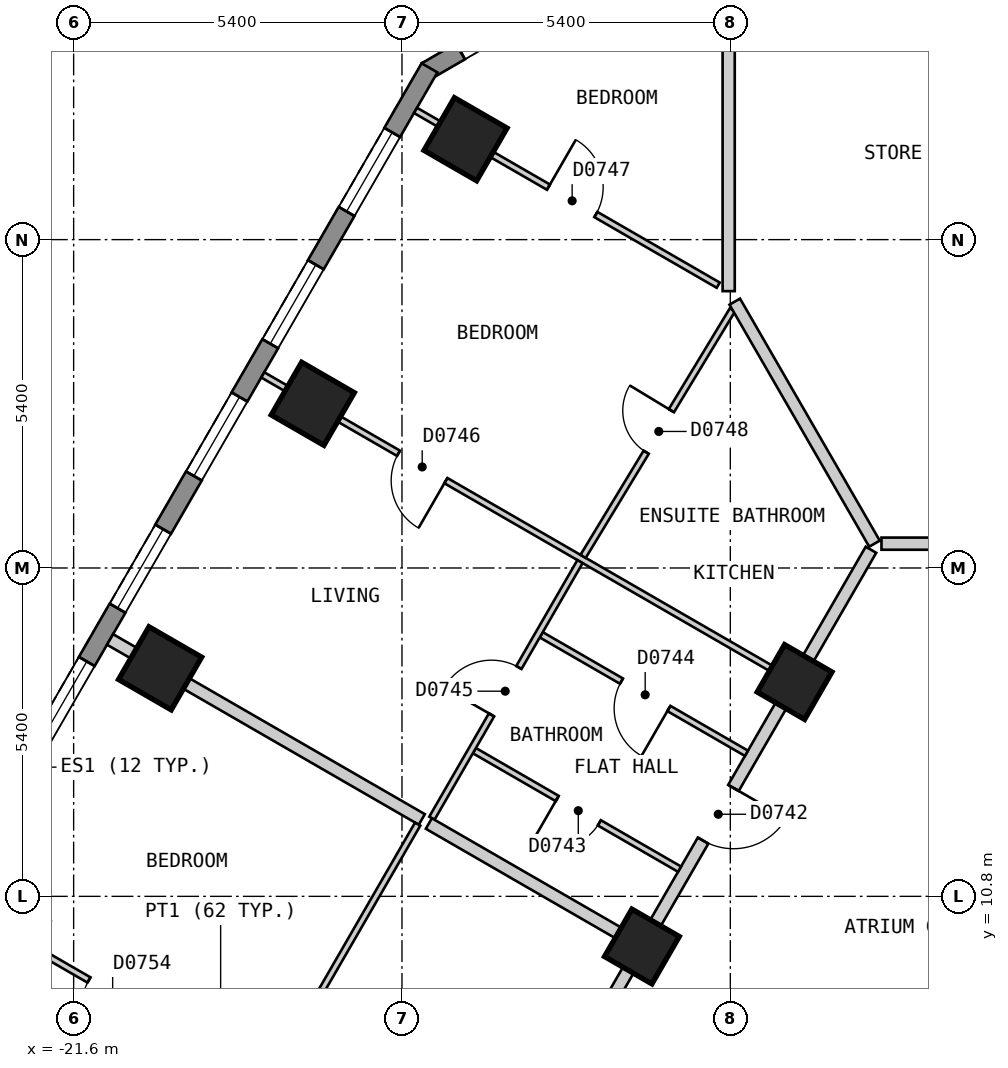
"""IFC4 building model, lengths in metres.
Left out: names, types, materials, properties, quantities, classifications, styles, units other than length and angle.
Written with IfcOpenShell. Run it as: python <this file> out.ifc"""

import sys

from ifc_helpers import new_model, si_unit, direction, frame, frame_2d, origin, origin_2d, place, context, subcontext, project, spatial, polyline, rectangle, outline, extrude, element, fill, save


model = new_model("IFC4")
c1 = context("Model", 3, precision=1e-05, world=origin(), true_north=direction((0.0, 1.0)))
c2 = subcontext(c1, "Body", "Model", "MODEL_VIEW")
j1 = project(units=[si_unit("LENGTHUNIT", "METRE"), si_unit("PLANEANGLEUNIT", "RADIAN")], contexts=[c1])
p1 = place(None, origin())
s1 = spatial("IfcSite", under=j1, at=p1, CompositionType="ELEMENT")
p2 = place(p1, origin())
s2 = spatial("IfcBuilding", under=s1, at=p2, CompositionType="ELEMENT")
p3 = place(p2, frame((0.0, 0.0, 93.0)))
s3 = spatial("IfcBuildingStorey", under=s2, at=p3, CompositionType="ELEMENT", Elevation=93.0)
for number, where, z_axis, x_axis in (
    (1, (-15.155, 23.251, 0.0), (0.0, 0.0, 1.0), (-0.5, -0.866, 0.0)),
    (2, (-17.667, 18.9, 0.0), (0.0, 0.0, 1.0), (-0.5, -0.866, 0.0)),
    (3, (-20.178, 14.55, 0.0), (0.0, 0.0, 1.0), (-0.5, -0.866, 0.0)),
):
    element("IfcColumn", number, at=place(p3, frame(where, z_axis=z_axis, x_axis=x_axis)), inside=s3, PredefinedType="COLUMN", context=c2, shape_type="SweptSolid", body=[
        extrude(rectangle(XDim=1.0, YDim=1.0, at=origin_2d()), origin(), (0.0, 0.0, 1.0), 3.0),
    ])
for number, where, z_axis, x_axis in (
    (4, (-9.743, 14.325, 0.0), (0.0, 0.0, 1.0), (-0.5, -0.866, 0.0)),
    (5, (-12.254, 9.975, 0.0), (0.0, 0.0, 1.0), (-0.5, -0.866, 0.0)),
):
    element("IfcColumn", number, at=place(p3, frame(where, z_axis=z_axis, x_axis=x_axis)), inside=s3, PredefinedType="COLUMN", context=c2, shape_type="SweptSolid", body=[
        extrude(rectangle(XDim=0.9, YDim=0.9, at=origin_2d()), origin(), (0.0, 0.0, 1.0), 3.0),
    ])
p4 = place(p3, frame((-11.472, 26.87, 0.0), z_axis=(0.0, 0.0, 1.0), x_axis=(-0.866022959057, -0.500004234368, 0.0)))
e6 = element("IfcWall", 6, at=p4, inside=s3, PredefinedType="SOLIDWALL", context=c2, shape_type="SweptSolid", body=[
    extrude(outline(polyline([(0.0, -0.15), (5.0, -0.15), (4.92, 0.15), (0.08, 0.15), (0.0, -0.15)])), origin(), (0.0, 0.0, 1.0), 2.7),
])
p5 = place(p4, frame((0.65, 0.0, 0.15)))
e7 = element("IfcOpeningElement", 7, at=p5, cuts=e6, PredefinedType="OPENING", context=c2, shape_type="SweptSolid", body=[
    extrude(rectangle(XDim=1.2, YDim=2.1, at=frame_2d((0.6, 1.05))), frame((0.0, 0.16, 0.0), z_axis=(0.0, -1.0, 0.0), x_axis=(1.0, 0.0, 0.0)), (0.0, 0.0, 1.0), 0.32),
])
p6 = place(p4, frame((3.149, 0.0, 0.15)))
e8 = element("IfcOpeningElement", 8, at=p6, cuts=e6, PredefinedType="OPENING", context=c2, shape_type="SweptSolid", body=[
    extrude(rectangle(XDim=1.2, YDim=2.1, at=frame_2d((0.6, 1.05))), frame((0.0, 0.16, 0.0), z_axis=(0.0, -1.0, 0.0), x_axis=(1.0, 0.0, 0.0)), (0.0, 0.0, 1.0), 0.32),
])
p7 = place(p3, frame((-15.747, 24.425, 0.0), z_axis=(0.0, 0.0, 1.0), x_axis=(-0.500027479704, -0.866009537788, 0.0)))
e9 = element("IfcWall", 9, at=p7, inside=s3, PredefinedType="SOLIDWALL", context=c2, shape_type="SweptSolid", body=[
    extrude(outline(polyline([(0.0, -0.15), (26.559, -0.15), (26.478, 0.15), (0.08, 0.15), (0.0, -0.15)])), origin(), (0.0, 0.0, 1.0), 2.7),
])
p8 = place(p7, frame((1.227, 0.0, 0.15)))
e10 = element("IfcOpeningElement", 10, at=p8, cuts=e9, PredefinedType="OPENING", context=c2, shape_type="SweptSolid", body=[
    extrude(rectangle(XDim=1.5, YDim=2.1, at=frame_2d((0.75, 1.05))), frame((0.0, 0.16, 0.0), z_axis=(0.0, -1.0, 0.0), x_axis=(1.0, 0.0, 0.0)), (0.0, 0.0, 1.0), 0.32),
])
p9 = place(p7, frame((3.739, 0.0, 0.15)))
e11 = element("IfcOpeningElement", 11, at=p9, cuts=e9, PredefinedType="OPENING", context=c2, shape_type="SweptSolid", body=[
    extrude(rectangle(XDim=1.5, YDim=2.1, at=frame_2d((0.75, 1.05))), frame((0.0, 0.16, 0.0), z_axis=(0.0, -1.0, 0.0), x_axis=(1.0, 0.0, 0.0)), (0.0, 0.0, 1.0), 0.32),
])
p10 = place(p7, frame((6.25, 0.0, 0.15)))
e12 = element("IfcOpeningElement", 12, at=p10, cuts=e9, PredefinedType="OPENING", context=c2, shape_type="SweptSolid", body=[
    extrude(rectangle(XDim=1.5, YDim=2.1, at=frame_2d((0.75, 1.05))), frame((0.0, 0.16, 0.0), z_axis=(0.0, -1.0, 0.0), x_axis=(1.0, 0.0, 0.0)), (0.0, 0.0, 1.0), 0.32),
])
p11 = place(p7, frame((8.761, 0.0, 0.15)))
e13 = element("IfcOpeningElement", 13, at=p11, cuts=e9, PredefinedType="OPENING", context=c2, shape_type="SweptSolid", body=[
    extrude(rectangle(XDim=1.5, YDim=2.1, at=frame_2d((0.75, 1.05))), frame((0.0, 0.16, 0.0), z_axis=(0.0, -1.0, 0.0), x_axis=(1.0, 0.0, 0.0)), (0.0, 0.0, 1.0), 0.32),
])
p12 = place(p7, frame((11.273, 0.0, 0.15)))
e14 = element("IfcOpeningElement", 14, at=p12, cuts=e9, PredefinedType="OPENING", context=c2, shape_type="SweptSolid", body=[
    extrude(rectangle(XDim=1.5, YDim=2.1, at=frame_2d((0.75, 1.05))), frame((0.0, 0.16, 0.0), z_axis=(0.0, -1.0, 0.0), x_axis=(1.0, 0.0, 0.0)), (0.0, 0.0, 1.0), 0.32),
])
p13 = place(p7, frame((13.785, 0.0, 0.15)))
e15 = element("IfcOpeningElement", 15, at=p13, cuts=e9, PredefinedType="OPENING", context=c2, shape_type="SweptSolid", body=[
    extrude(rectangle(XDim=1.5, YDim=2.1, at=frame_2d((0.75, 1.05))), frame((0.0, 0.16, 0.0), z_axis=(0.0, -1.0, 0.0), x_axis=(1.0, 0.0, 0.0)), (0.0, 0.0, 1.0), 0.32),
])
p14 = place(p7, frame((16.296, 0.0, 0.15)))
e16 = element("IfcOpeningElement", 16, at=p14, cuts=e9, PredefinedType="OPENING", context=c2, shape_type="SweptSolid", body=[
    extrude(rectangle(XDim=1.5, YDim=2.1, at=frame_2d((0.75, 1.05))), frame((0.0, 0.16, 0.0), z_axis=(0.0, -1.0, 0.0), x_axis=(1.0, 0.0, 0.0)), (0.0, 0.0, 1.0), 0.32),
])
p15 = place(p7, frame((18.807, 0.0, 0.15)))
e17 = element("IfcOpeningElement", 17, at=p15, cuts=e9, PredefinedType="OPENING", context=c2, shape_type="SweptSolid", body=[
    extrude(rectangle(XDim=1.5, YDim=2.1, at=frame_2d((0.75, 1.05))), frame((0.0, 0.16, 0.0), z_axis=(0.0, -1.0, 0.0), x_axis=(1.0, 0.0, 0.0)), (0.0, 0.0, 1.0), 0.32),
])
p16 = place(p7, frame((21.319, 0.0, 0.15)))
e18 = element("IfcOpeningElement", 18, at=p16, cuts=e9, PredefinedType="OPENING", context=c2, shape_type="SweptSolid", body=[
    extrude(rectangle(XDim=1.5, YDim=2.1, at=frame_2d((0.75, 1.05))), frame((0.0, 0.16, 0.0), z_axis=(0.0, -1.0, 0.0), x_axis=(1.0, 0.0, 0.0)), (0.0, 0.0, 1.0), 0.32),
])
p17 = place(p7, frame((23.831, 0.0, 0.15)))
e19 = element("IfcOpeningElement", 19, at=p17, cuts=e9, PredefinedType="OPENING", context=c2, shape_type="SweptSolid", body=[
    extrude(rectangle(XDim=1.5, YDim=2.1, at=frame_2d((0.75, 1.05))), frame((0.0, 0.16, 0.0), z_axis=(0.0, -1.0, 0.0), x_axis=(1.0, 0.0, 0.0)), (0.0, 0.0, 1.0), 0.32),
])
p18 = place(p3, frame((-8.314, 16.6, 0.0), z_axis=(0.0, 0.0, 1.0), x_axis=(1.0, 0.0, 0.0)))
e20 = element("IfcWall", 20, at=p18, inside=s3, PredefinedType="PARTITIONING", context=c2, shape_type="SweptSolid", body=[
    extrude(rectangle(XDim=2.309, YDim=0.2, at=frame_2d((1.155, 0.0))), origin(), (0.0, 0.0, 1.0), 2.7),
])
p19 = place(p18, frame((0.977, 0.0, 0.0)))
e21 = element("IfcOpeningElement", 21, at=p19, cuts=e20, PredefinedType="OPENING", context=c2, shape_type="SweptSolid", body=[
    extrude(rectangle(XDim=0.8, YDim=2.1, at=frame_2d((0.4, 1.05))), frame((0.0, 0.11, 0.0), z_axis=(0.0, -1.0, 0.0), x_axis=(1.0, 0.0, 0.0)), (0.0, 0.0, 1.0), 0.22),
])
p20 = place(p3, frame((-18.533, -0.901, 0.0), z_axis=(0.0, 0.0, 1.0), x_axis=(0.499981198768, 0.866036258409, 0.0)))
e22 = element("IfcWall", 22, at=p20, inside=s3, PredefinedType="PARTITIONING", context=c2, shape_type="SweptSolid", body=[
    extrude(rectangle(XDim=20.093, YDim=0.2, at=frame_2d((10.046, 0.0))), origin(), (0.0, 0.0, 1.0), 2.7),
])
p21 = place(p20, frame((14.57, 0.0, 0.0)))
e23 = element("IfcOpeningElement", 23, at=p21, cuts=e22, PredefinedType="OPENING", context=c2, shape_type="SweptSolid", body=[
    extrude(rectangle(XDim=1.0, YDim=2.1, at=frame_2d((0.5, 1.05))), frame((0.0, 0.11, 0.0), z_axis=(0.0, -1.0, 0.0), x_axis=(1.0, 0.0, 0.0)), (0.0, 0.0, 1.0), 0.22),
])
p22 = place(p20, frame((4.523, 0.0, 0.0)))
e24 = element("IfcOpeningElement", 24, at=p22, cuts=e22, PredefinedType="OPENING", context=c2, shape_type="SweptSolid", body=[
    extrude(rectangle(XDim=1.0, YDim=2.1, at=frame_2d((0.5, 1.05))), frame((0.0, 0.11, 0.0), z_axis=(0.0, -1.0, 0.0), x_axis=(1.0, 0.0, 0.0)), (0.0, 0.0, 1.0), 0.22),
])
p23 = place(p3, frame((-23.513, 10.675, 0.0), z_axis=(0.0, 0.0, 1.0), x_axis=(0.866041268327, -0.499972520799, 0.0)))
e25 = element("IfcWall", 25, at=p23, inside=s3, PredefinedType="PARTITIONING", context=c2, shape_type="SweptSolid", body=[
    extrude(rectangle(XDim=10.0, YDim=0.1, at=frame_2d((5.0, 0.0))), origin(), (0.0, 0.0, 1.0), 2.7),
])
p24 = place(p23, frame((7.55, 0.0, 0.0)))
e26 = element("IfcOpeningElement", 26, at=p24, cuts=e25, PredefinedType="OPENING", context=c2, shape_type="SweptSolid", body=[
    extrude(rectangle(XDim=0.9, YDim=2.1, at=frame_2d((0.45, 1.05))), frame((0.0, 0.06, 0.0), z_axis=(0.0, -1.0, 0.0), x_axis=(1.0, 0.0, 0.0)), (0.0, 0.0, 1.0), 0.12),
])
p25 = place(p23, frame((2.5, 0.0, 0.0)))
e27 = element("IfcOpeningElement", 27, at=p25, cuts=e25, PredefinedType="OPENING", context=c2, shape_type="SweptSolid", body=[
    extrude(rectangle(XDim=0.9, YDim=2.1, at=frame_2d((0.45, 1.05))), frame((0.0, 0.06, 0.0), z_axis=(0.0, -1.0, 0.0), x_axis=(1.0, 0.0, 0.0)), (0.0, 0.0, 1.0), 0.12),
])
p26 = place(p3, frame((-15.009, 13.196, 0.0), z_axis=(0.0, 0.0, 1.0), x_axis=(0.865916335424, -0.500188864377, 0.0)))
e28 = element("IfcWall", 28, at=p26, inside=s3, PredefinedType="PARTITIONING", context=c2, shape_type="SweptSolid", body=[
    extrude(rectangle(XDim=3.896, YDim=0.1, at=frame_2d((1.948, 0.0))), origin(), (0.0, 0.0, 1.0), 2.7),
])
p27 = place(p26, frame((1.573, 0.0, 0.0)))
e29 = element("IfcOpeningElement", 29, at=p27, cuts=e28, PredefinedType="OPENING", context=c2, shape_type="SweptSolid", body=[
    extrude(rectangle(XDim=0.8, YDim=2.1, at=frame_2d((0.4, 1.05))), frame((0.0, 0.06, 0.0), z_axis=(0.0, -1.0, 0.0), x_axis=(1.0, 0.0, 0.0)), (0.0, 0.0, 1.0), 0.12),
])
p28 = place(p3, frame((-13.909, 15.101, 0.0), z_axis=(0.0, 0.0, 1.0), x_axis=(0.866024880635, -0.500000906121, 0.0)))
e30 = element("IfcWall", 30, at=p28, inside=s3, PredefinedType="PARTITIONING", context=c2, shape_type="SweptSolid", body=[
    extrude(rectangle(XDim=3.896, YDim=0.1, at=frame_2d((1.948, 0.0))), origin(), (0.0, 0.0, 1.0), 2.7),
])
p29 = place(p28, frame((1.523, 0.0, 0.0)))
e31 = element("IfcOpeningElement", 31, at=p29, cuts=e30, PredefinedType="OPENING", context=c2, shape_type="SweptSolid", body=[
    extrude(rectangle(XDim=0.9, YDim=2.1, at=frame_2d((0.45, 1.05))), frame((0.0, 0.06, 0.0), z_axis=(0.0, -1.0, 0.0), x_axis=(1.0, 0.0, 0.0)), (0.0, 0.0, 1.0), 0.12),
])
p30 = place(p3, frame((-18.489, 19.375, 0.0), z_axis=(0.0, 0.0, 1.0), x_axis=(0.866016855193, -0.500014806302, 0.0)))
e32 = element("IfcWall", 32, at=p30, inside=s3, PredefinedType="PARTITIONING", context=c2, shape_type="SweptSolid", body=[
    extrude(rectangle(XDim=10.0, YDim=0.1, at=frame_2d((5.0, 0.0))), origin(), (0.0, 0.0, 1.0), 2.7),
])
p31 = place(p30, frame((2.577, 0.0, 0.0)))
e33 = element("IfcOpeningElement", 33, at=p31, cuts=e32, PredefinedType="OPENING", context=c2, shape_type="SweptSolid", body=[
    extrude(rectangle(XDim=0.9, YDim=2.1, at=frame_2d((0.45, 1.05))), frame((0.0, 0.06, 0.0), z_axis=(0.0, -1.0, 0.0), x_axis=(1.0, 0.0, 0.0)), (0.0, 0.0, 1.0), 0.12),
])
p32 = place(p3, frame((-15.977, 23.725, 0.0), z_axis=(0.0, 0.0, 1.0), x_axis=(0.866028566888, -0.499994521305, 0.0)))
e34 = element("IfcWall", 34, at=p32, inside=s3, PredefinedType="PARTITIONING", context=c2, shape_type="SweptSolid", body=[
    extrude(rectangle(XDim=5.748, YDim=0.1, at=frame_2d((2.874, 0.0))), origin(), (0.0, 0.0, 1.0), 2.7),
])
p33 = place(p32, frame((2.524, 0.0, 0.0)))
e35 = element("IfcOpeningElement", 35, at=p33, cuts=e34, PredefinedType="OPENING", context=c2, shape_type="SweptSolid", body=[
    extrude(rectangle(XDim=0.9, YDim=2.1, at=frame_2d((0.45, 1.05))), frame((0.0, 0.06, 0.0), z_axis=(0.0, -1.0, 0.0), x_axis=(1.0, 0.0, 0.0)), (0.0, 0.0, 1.0), 0.12),
])
p34 = place(p3, frame((-13.221, 16.391, 0.0), z_axis=(0.0, 0.0, 1.0), x_axis=(0.518164725284, 0.855280841286, 0.0)))
e36 = element("IfcWall", 36, at=p34, inside=s3, PredefinedType="PARTITIONING", context=c2, shape_type="SweptSolid", body=[
    extrude(rectangle(XDim=4.74, YDim=0.1, at=frame_2d((2.37, 0.0))), origin(), (0.0, 0.0, 1.0), 2.7),
])
p35 = place(p34, frame((2.002, 0.0, 0.0)))
e37 = element("IfcOpeningElement", 37, at=p35, cuts=e36, PredefinedType="OPENING", context=c2, shape_type="SweptSolid", body=[
    extrude(rectangle(XDim=0.8, YDim=2.1, at=frame_2d((0.4, 1.05))), frame((0.0, 0.06, 0.0), z_axis=(0.0, -1.0, 0.0), x_axis=(1.0, 0.0, 0.0)), (0.0, 0.0, 1.0), 0.12),
])
p36 = place(p3, frame((-15.708, 12.085, 0.0), z_axis=(0.0, 0.0, 1.0), x_axis=(0.499943653708, 0.866057932887, 0.0)))
e38 = element("IfcWall", 38, at=p36, inside=s3, PredefinedType="PARTITIONING", context=c2, shape_type="SweptSolid", body=[
    extrude(rectangle(XDim=4.873, YDim=0.1, at=frame_2d((2.436, 0.0))), origin(), (0.0, 0.0, 1.0), 2.7),
])
p37 = place(p36, frame((1.962, 0.0, 0.0)))
e39 = element("IfcOpeningElement", 39, at=p37, cuts=e38, PredefinedType="OPENING", context=c2, shape_type="SweptSolid", body=[
    extrude(rectangle(XDim=0.9, YDim=2.1, at=frame_2d((0.45, 1.05))), frame((0.0, 0.06, 0.0), z_axis=(0.0, -1.0, 0.0), x_axis=(1.0, 0.0, 0.0)), (0.0, 0.0, 1.0), 0.12),
])
p38 = place(p3, frame((-10.727, 20.58, 0.0), z_axis=(0.0, 0.0, 1.0), x_axis=(0.500041272028, -0.866001574057, 0.0)))
e40 = element("IfcWall", 40, at=p38, inside=s3, PredefinedType="PARTITIONING", context=c2, shape_type="SweptSolid", body=[
    extrude(rectangle(XDim=4.596, YDim=0.2, at=frame_2d((2.298, 0.0))), origin(), (0.0, 0.0, 1.0), 2.7),
])
p39 = place(p3, frame((-21.001, 15.025, 0.0), z_axis=(0.0, 0.0, 1.0), x_axis=(0.866031754707, -0.499988999718, 0.0)))
e41 = element("IfcWall", 41, at=p39, inside=s3, PredefinedType="PARTITIONING", context=c2, shape_type="SweptSolid", body=[
    extrude(rectangle(XDim=5.92, YDim=0.2, at=frame_2d((2.96, 0.0))), origin(), (0.0, 0.0, 1.0), 2.7),
])
p40 = place(p3, frame((-15.758, 11.998, 0.0), z_axis=(0.0, 0.0, 1.0), x_axis=(0.865987741337, -0.5000652276, 0.0)))
e42 = element("IfcWall", 42, at=p40, inside=s3, PredefinedType="PARTITIONING", context=c2, shape_type="SweptSolid", body=[
    extrude(rectangle(XDim=3.946, YDim=0.2, at=frame_2d((1.973, 0.0))), origin(), (0.0, 0.0, 1.0), 2.7),
])
p41 = place(p3, frame((-10.827, 20.753, 0.0), z_axis=(0.0, 0.0, 1.0), x_axis=(0.0, 1.0, 0.0)))
e43 = element("IfcWall", 43, at=p41, inside=s3, PredefinedType="PARTITIONING", context=c2, shape_type="SweptSolid", body=[
    extrude(rectangle(XDim=5.947, YDim=0.2, at=frame_2d((2.974, 0.0))), origin(), (0.0, 0.0, 1.0), 2.7),
])
p42 = place(p3, frame((-18.403, 7.725, 0.0), z_axis=(0.0, 0.0, 1.0), x_axis=(0.499995794706, 0.866027831699, 0.0)))
e44 = element("IfcWall", 44, at=p42, inside=s3, PredefinedType="PARTITIONING", context=c2, shape_type="SweptSolid", body=[
    extrude(rectangle(XDim=4.922, YDim=0.1, at=frame_2d((2.461, 0.0))), origin(), (0.0, 0.0, 1.0), 2.7),
])
p43 = place(p6, origin())
e45 = element("IfcWindow", 45, at=p43, inside=s3, PartitioningType="SINGLE_PANEL", PredefinedType="WINDOW", context=c2, shape_type="SweptSolid", body=[
    extrude(rectangle(XDim=1.2, YDim=2.1, at=frame_2d((0.6, 1.05))), frame((0.0, 0.03, 0.0), z_axis=(0.0, -1.0, 0.0), x_axis=(1.0, 0.0, 0.0)), (0.0, 0.0, 1.0), 0.06),
])
fill(e8, e45)
p44 = place(p8, origin())
e46 = element("IfcWindow", 46, at=p44, inside=s3, PartitioningType="SINGLE_PANEL", PredefinedType="WINDOW", context=c2, shape_type="SweptSolid", body=[
    extrude(rectangle(XDim=1.5, YDim=2.1, at=frame_2d((0.75, 1.05))), frame((0.0, 0.03, 0.0), z_axis=(0.0, -1.0, 0.0), x_axis=(1.0, 0.0, 0.0)), (0.0, 0.0, 1.0), 0.06),
])
fill(e10, e46)
p45 = place(p9, origin())
e47 = element("IfcWindow", 47, at=p45, inside=s3, PartitioningType="SINGLE_PANEL", PredefinedType="WINDOW", context=c2, shape_type="SweptSolid", body=[
    extrude(rectangle(XDim=1.5, YDim=2.1, at=frame_2d((0.75, 1.05))), frame((0.0, 0.03, 0.0), z_axis=(0.0, -1.0, 0.0), x_axis=(1.0, 0.0, 0.0)), (0.0, 0.0, 1.0), 0.06),
])
fill(e11, e47)
p46 = place(p10, origin())
e48 = element("IfcWindow", 48, at=p46, inside=s3, PartitioningType="SINGLE_PANEL", PredefinedType="WINDOW", context=c2, shape_type="SweptSolid", body=[
    extrude(rectangle(XDim=1.5, YDim=2.1, at=frame_2d((0.75, 1.05))), frame((0.0, 0.03, 0.0), z_axis=(0.0, -1.0, 0.0), x_axis=(1.0, 0.0, 0.0)), (0.0, 0.0, 1.0), 0.06),
])
fill(e12, e48)
p47 = place(p11, origin())
e49 = element("IfcWindow", 49, at=p47, inside=s3, PartitioningType="SINGLE_PANEL", PredefinedType="WINDOW", context=c2, shape_type="SweptSolid", body=[
    extrude(rectangle(XDim=1.5, YDim=2.1, at=frame_2d((0.75, 1.05))), frame((0.0, 0.03, 0.0), z_axis=(0.0, -1.0, 0.0), x_axis=(1.0, 0.0, 0.0)), (0.0, 0.0, 1.0), 0.06),
])
fill(e13, e49)
p48 = place(p12, origin())
e50 = element("IfcWindow", 50, at=p48, inside=s3, PartitioningType="SINGLE_PANEL", PredefinedType="WINDOW", context=c2, shape_type="SweptSolid", body=[
    extrude(rectangle(XDim=1.5, YDim=2.1, at=frame_2d((0.75, 1.05))), frame((0.0, 0.03, 0.0), z_axis=(0.0, -1.0, 0.0), x_axis=(1.0, 0.0, 0.0)), (0.0, 0.0, 1.0), 0.06),
])
fill(e14, e50)
p49 = place(p21, origin())
e51 = element("IfcDoor", 51, at=p49, inside=s3, OperationType="SINGLE_SWING_RIGHT", PredefinedType="DOOR", context=c2, shape_type="SweptSolid", body=[
    extrude(rectangle(XDim=1.0, YDim=2.1, at=frame_2d((0.5, 1.05))), frame((0.0, 0.025, 0.0), z_axis=(0.0, -1.0, 0.0), x_axis=(1.0, 0.0, 0.0)), (0.0, 0.0, 1.0), 0.05),
])
fill(e23, e51)
p50 = place(p27, origin())
e52 = element("IfcDoor", 52, at=p50, inside=s3, OperationType="SINGLE_SWING_LEFT", PredefinedType="DOOR", context=c2, shape_type="SweptSolid", body=[
    extrude(rectangle(XDim=0.8, YDim=2.1, at=frame_2d((0.4, 1.05))), frame((0.0, 0.025, 0.0), z_axis=(0.0, -1.0, 0.0), x_axis=(1.0, 0.0, 0.0)), (0.0, 0.0, 1.0), 0.05),
])
fill(e29, e52)
p51 = place(p29, origin())
e53 = element("IfcDoor", 53, at=p51, inside=s3, OperationType="SINGLE_SWING_RIGHT", PredefinedType="DOOR", context=c2, shape_type="SweptSolid", body=[
    extrude(rectangle(XDim=0.9, YDim=2.1, at=frame_2d((0.45, 1.05))), frame((0.0, 0.025, 0.0), z_axis=(0.0, -1.0, 0.0), x_axis=(1.0, 0.0, 0.0)), (0.0, 0.0, 1.0), 0.05),
])
fill(e31, e53)
p52 = place(p37, origin())
e54 = element("IfcDoor", 54, at=p52, inside=s3, OperationType="SINGLE_SWING_LEFT", PredefinedType="DOOR", context=c2, shape_type="SweptSolid", body=[
    extrude(rectangle(XDim=0.9, YDim=2.1, at=frame_2d((0.45, 1.05))), frame((0.0, 0.025, 0.0), z_axis=(0.0, -1.0, 0.0), x_axis=(1.0, 0.0, 0.0)), (0.0, 0.0, 1.0), 0.05),
])
fill(e39, e54)
p53 = place(p31, origin())
e55 = element("IfcDoor", 55, at=p53, inside=s3, OperationType="SINGLE_SWING_RIGHT", PredefinedType="DOOR", context=c2, shape_type="SweptSolid", body=[
    extrude(rectangle(XDim=0.9, YDim=2.1, at=frame_2d((0.45, 1.05))), frame((0.0, 0.025, 0.0), z_axis=(0.0, -1.0, 0.0), x_axis=(1.0, 0.0, 0.0)), (0.0, 0.0, 1.0), 0.05),
])
fill(e33, e55)
p54 = place(p33, origin())
e56 = element("IfcDoor", 56, at=p54, inside=s3, OperationType="SINGLE_SWING_LEFT", PredefinedType="DOOR", context=c2, shape_type="SweptSolid", body=[
    extrude(rectangle(XDim=0.9, YDim=2.1, at=frame_2d((0.45, 1.05))), frame((0.0, 0.025, 0.0), z_axis=(0.0, -1.0, 0.0), x_axis=(1.0, 0.0, 0.0)), (0.0, 0.0, 1.0), 0.05),
])
fill(e35, e56)
p55 = place(p35, origin())
e57 = element("IfcDoor", 57, at=p55, inside=s3, OperationType="SINGLE_SWING_RIGHT", PredefinedType="DOOR", context=c2, shape_type="SweptSolid", body=[
    extrude(rectangle(XDim=0.8, YDim=2.1, at=frame_2d((0.4, 1.05))), frame((0.0, 0.025, 0.0), z_axis=(0.0, -1.0, 0.0), x_axis=(1.0, 0.0, 0.0)), (0.0, 0.0, 1.0), 0.05),
])
fill(e37, e57)
p56 = place(p25, origin())
e58 = element("IfcDoor", 58, at=p56, inside=s3, OperationType="SINGLE_SWING_RIGHT", PredefinedType="DOOR", context=c2, shape_type="SweptSolid", body=[
    extrude(rectangle(XDim=0.9, YDim=2.1, at=frame_2d((0.45, 1.05))), frame((0.0, 0.025, 0.0), z_axis=(0.0, -1.0, 0.0), x_axis=(1.0, 0.0, 0.0)), (0.0, 0.0, 1.0), 0.05),
])
fill(e27, e58)
save(model, sys.argv[1])
